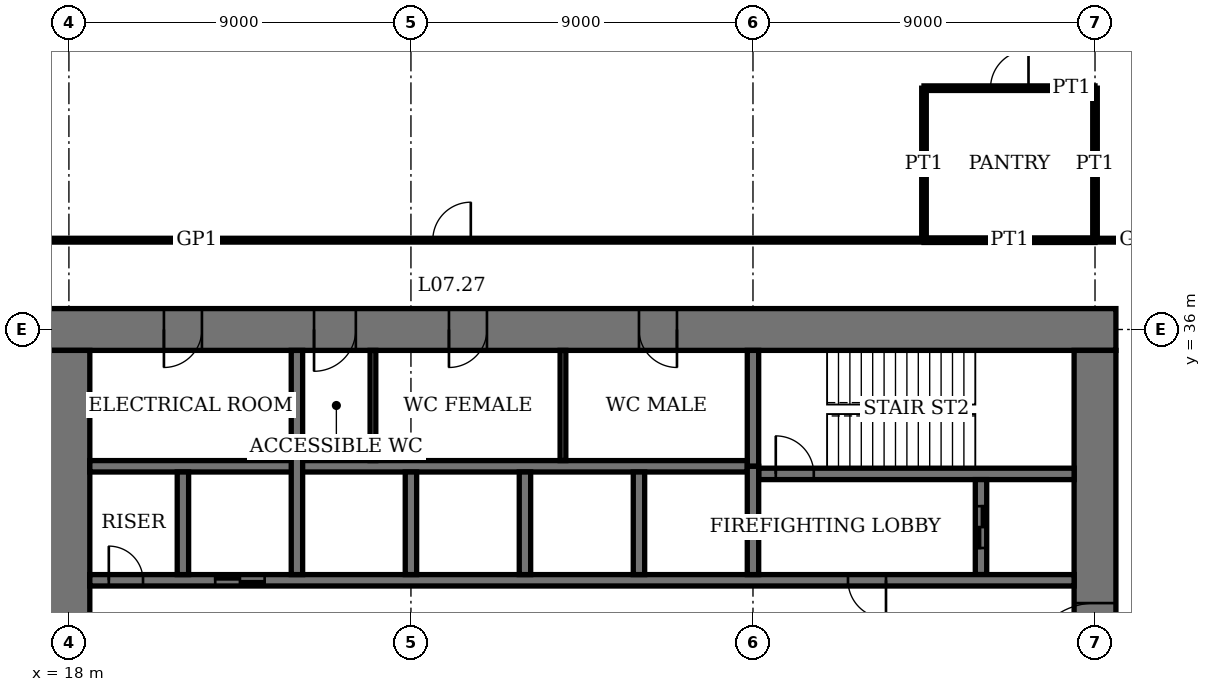
"""IFC4 building model, lengths in metres.
Left out: names, types, materials, properties, quantities, classifications, styles, units other than length and angle.
Written with IfcOpenShell. Run it as: python <this file> out.ifc"""

import sys

from ifc_helpers import new_model, si_unit, direction, frame, frame_2d, origin, place, context, subcontext, project, spatial, rectangle, extrude, element, fill, save


model = new_model("IFC4")
c1 = context("Model", 3, precision=1e-05, world=origin(), true_north=direction((0.0, 1.0)))
c2 = subcontext(c1, "Body", "Model", "MODEL_VIEW")
j1 = project(units=[si_unit("LENGTHUNIT", "METRE"), si_unit("PLANEANGLEUNIT", "RADIAN")], contexts=[c1])
p1 = place(None, origin())
s1 = spatial("IfcSite", under=j1, at=p1, CompositionType="ELEMENT")
p2 = place(p1, origin())
s2 = spatial("IfcBuilding", under=s1, at=p2, CompositionType="ELEMENT")
p3 = place(p2, frame((0.0, 0.0, 31.8)))
s3 = spatial("IfcBuildingStorey", under=s2, at=p3, CompositionType="ELEMENT", Elevation=31.8)
p4 = place(p3, frame((45.55, 36.0, 0.0), z_axis=(0.0, 0.0, 1.0), x_axis=(-1.0, 0.0, 0.0)))
e1 = element("IfcWall", 1, at=p4, inside=s3, PredefinedType="SHEAR", context=c2, shape_type="SweptSolid", body=[
    extrude(rectangle(XDim=28.1, YDim=1.1, at=frame_2d((14.05, 0.0))), origin(), (0.0, 0.0, 1.0), 4.0),
])
p5 = place(p4, frame((11.55, 0.0, 0.0)))
e2 = element("IfcOpeningElement", 2, at=p5, cuts=e1, PredefinedType="OPENING", context=c2, shape_type="SweptSolid", body=[
    extrude(rectangle(XDim=1.0, YDim=2.4, at=frame_2d((0.5, 1.2))), frame((0.0, 0.56, 0.0), z_axis=(0.0, -1.0, 0.0), x_axis=(1.0, 0.0, 0.0)), (0.0, 0.0, 1.0), 1.12),
])
p6 = place(p4, frame((16.55, 0.0, 0.0)))
e3 = element("IfcOpeningElement", 3, at=p6, cuts=e1, PredefinedType="OPENING", context=c2, shape_type="SweptSolid", body=[
    extrude(rectangle(XDim=1.0, YDim=2.4, at=frame_2d((0.5, 1.2))), frame((0.0, 0.56, 0.0), z_axis=(0.0, -1.0, 0.0), x_axis=(1.0, 0.0, 0.0)), (0.0, 0.0, 1.0), 1.12),
])
p7 = place(p4, frame((20.0, 0.0, 0.0)))
e4 = element("IfcOpeningElement", 4, at=p7, cuts=e1, PredefinedType="OPENING", context=c2, shape_type="SweptSolid", body=[
    extrude(rectangle(XDim=1.1, YDim=2.4, at=frame_2d((0.55, 1.2))), frame((0.0, 0.56, 0.0), z_axis=(0.0, -1.0, 0.0), x_axis=(1.0, 0.0, 0.0)), (0.0, 0.0, 1.0), 1.12),
])
p8 = place(p4, frame((24.05, 0.0, 0.0)))
e5 = element("IfcOpeningElement", 5, at=p8, cuts=e1, PredefinedType="OPENING", context=c2, shape_type="SweptSolid", body=[
    extrude(rectangle(XDim=1.0, YDim=2.4, at=frame_2d((0.5, 1.2))), frame((0.0, 0.56, 0.0), z_axis=(0.0, -1.0, 0.0), x_axis=(1.0, 0.0, 0.0)), (0.0, 0.0, 1.0), 1.12),
])
p9 = place(p3, frame((18.0, 35.45, 0.0), z_axis=(0.0, 0.0, 1.0), x_axis=(0.0, -1.0, 0.0)))
e6 = element("IfcWall", 6, at=p9, inside=s3, PredefinedType="SHEAR", context=c2, shape_type="SweptSolid", body=[
    extrude(rectangle(XDim=16.9, YDim=1.1, at=frame_2d((8.45, 0.0))), origin(), (0.0, 0.0, 1.0), 4.0),
])
p10 = place(p9, frame((8.45, 0.0, 0.0)))
e7 = element("IfcOpeningElement", 7, at=p10, cuts=e6, PredefinedType="OPENING", context=c2, shape_type="SweptSolid", body=[
    extrude(rectangle(XDim=1.8, YDim=2.4, at=frame_2d((0.9, 1.2))), frame((0.0, 0.56, 0.0), z_axis=(0.0, -1.0, 0.0), x_axis=(1.0, 0.0, 0.0)), (0.0, 0.0, 1.0), 1.12),
])
p11 = place(p3, frame((45.0, 18.55, 0.0), z_axis=(0.0, 0.0, 1.0), x_axis=(0.0, 1.0, 0.0)))
e8 = element("IfcWall", 8, at=p11, inside=s3, PredefinedType="SHEAR", context=c2, shape_type="SweptSolid", body=[
    extrude(rectangle(XDim=16.9, YDim=1.1, at=frame_2d((8.45, 0.0))), origin(), (0.0, 0.0, 1.0), 4.0),
])
p12 = place(p11, frame((8.45, 0.0, 0.0)))
e9 = element("IfcOpeningElement", 9, at=p12, cuts=e8, PredefinedType="OPENING", context=c2, shape_type="SweptSolid", body=[
    extrude(rectangle(XDim=1.8, YDim=2.4, at=frame_2d((0.9, 1.2))), frame((0.0, 0.56, 0.0), z_axis=(0.0, -1.0, 0.0), x_axis=(1.0, 0.0, 0.0)), (0.0, 0.0, 1.0), 1.12),
])
p13 = place(p3, frame((36.15, 32.2, 0.0), z_axis=(0.0, 0.0, 1.0), x_axis=(1.0, 0.0, 0.0)))
e10 = element("IfcWall", 10, at=p13, inside=s3, PredefinedType="SHEAR", context=c2, shape_type="SweptSolid", body=[
    extrude(rectangle(XDim=8.3, YDim=0.3, at=frame_2d((4.15, 0.0))), origin(), (0.0, 0.0, 1.0), 4.0),
])
p14 = place(p13, frame((0.45, 0.0, 0.0)))
e11 = element("IfcOpeningElement", 11, at=p14, cuts=e10, PredefinedType="OPENING", context=c2, shape_type="SweptSolid", body=[
    extrude(rectangle(XDim=1.0, YDim=2.4, at=frame_2d((0.5, 1.2))), frame((0.0, 0.16, 0.0), z_axis=(0.0, -1.0, 0.0), x_axis=(1.0, 0.0, 0.0)), (0.0, 0.0, 1.0), 0.32),
])
p15 = place(p3, frame((36.0, 32.4, 0.0), z_axis=(0.0, 0.0, 1.0), x_axis=(0.0, 1.0, 0.0)))
e12 = element("IfcWall", 12, at=p15, inside=s3, PredefinedType="SHEAR", context=c2, shape_type="SweptSolid", body=[
    extrude(rectangle(XDim=3.05, YDim=0.3, at=frame_2d((1.525, 0.0))), origin(), (0.0, 0.0, 1.0), 4.0),
])
p16 = place(p3, frame((42.0, 29.55, 0.0), z_axis=(0.0, 0.0, 1.0), x_axis=(0.0, 1.0, 0.0)))
e13 = element("IfcWall", 13, at=p16, inside=s3, PredefinedType="SHEAR", context=c2, shape_type="SweptSolid", body=[
    extrude(rectangle(XDim=2.5, YDim=0.3, at=frame_2d((1.25, 0.0))), origin(), (0.0, 0.0, 1.0), 4.0),
])
p17 = place(p16, frame((0.7, 0.0, 0.0)))
e14 = element("IfcOpeningElement", 14, at=p17, cuts=e13, PredefinedType="OPENING", context=c2, shape_type="SweptSolid", body=[
    extrude(rectangle(XDim=1.1, YDim=2.4, at=frame_2d((0.55, 1.2))), frame((0.0, 0.16, 0.0), z_axis=(0.0, -1.0, 0.0), x_axis=(1.0, 0.0, 0.0)), (0.0, 0.0, 1.0), 0.32),
])
p18 = place(p3, frame((18.55, 29.4, 0.0), z_axis=(0.0, 0.0, 1.0), x_axis=(1.0, 0.0, 0.0)))
e15 = element("IfcWall", 15, at=p18, inside=s3, PredefinedType="SHEAR", context=c2, shape_type="SweptSolid", body=[
    extrude(rectangle(XDim=25.9, YDim=0.3, at=frame_2d((12.95, 0.0))), origin(), (0.0, 0.0, 1.0), 4.0),
])
p19 = place(p18, frame((19.95, 0.0, 0.0)))
e16 = element("IfcOpeningElement", 16, at=p19, cuts=e15, PredefinedType="OPENING", context=c2, shape_type="SweptSolid", body=[
    extrude(rectangle(XDim=1.0, YDim=2.4, at=frame_2d((0.5, 1.2))), frame((0.0, 0.16, 0.0), z_axis=(0.0, -1.0, 0.0), x_axis=(1.0, 0.0, 0.0)), (0.0, 0.0, 1.0), 0.32),
])
p20 = place(p18, frame((0.5, 0.0, 0.0)))
e17 = element("IfcOpeningElement", 17, at=p20, cuts=e15, PredefinedType="OPENING", context=c2, shape_type="SweptSolid", body=[
    extrude(rectangle(XDim=0.9, YDim=2.1, at=frame_2d((0.45, 1.05))), frame((0.0, 0.16, 0.0), z_axis=(0.0, -1.0, 0.0), x_axis=(1.0, 0.0, 0.0)), (0.0, 0.0, 1.0), 0.32),
])
p21 = place(p18, frame((3.3, 0.0, 0.0)))
e18 = element("IfcOpeningElement", 18, at=p21, cuts=e15, PredefinedType="OPENING", context=c2, shape_type="SweptSolid", body=[
    extrude(rectangle(XDim=1.3, YDim=2.4, at=frame_2d((0.65, 1.2))), frame((0.0, 0.16, 0.0), z_axis=(0.0, -1.0, 0.0), x_axis=(1.0, 0.0, 0.0)), (0.0, 0.0, 1.0), 0.32),
])
p22 = place(p3, frame((18.55, 32.4, 0.0), z_axis=(0.0, 0.0, 1.0), x_axis=(1.0, 0.0, 0.0)))
e19 = element("IfcWall", 19, at=p22, inside=s3, PredefinedType="SHEAR", context=c2, shape_type="SweptSolid", body=[
    extrude(rectangle(XDim=17.3, YDim=0.3, at=frame_2d((8.65, 0.0))), origin(), (0.0, 0.0, 1.0), 4.0),
])
for number, where, z_axis, x_axis in (
    (20, (33.0, 29.55, 0.0), (0.0, 0.0, 1.0), (0.0, 1.0, 0.0)),
    (21, (30.0, 29.55, 0.0), (0.0, 0.0, 1.0), (0.0, 1.0, 0.0)),
    (22, (27.0, 29.55, 0.0), (0.0, 0.0, 1.0), (0.0, 1.0, 0.0)),
):
    element("IfcWall", number, at=place(p3, frame(where, z_axis=z_axis, x_axis=x_axis)), inside=s3, PredefinedType="SHEAR", context=c2, shape_type="SweptSolid", body=[
        extrude(rectangle(XDim=2.7, YDim=0.3, at=frame_2d((1.35, 0.0))), origin(), (0.0, 0.0, 1.0), 4.0),
    ])
p23 = place(p3, frame((24.0, 29.55, 0.0), z_axis=(0.0, 0.0, 1.0), x_axis=(0.0, 1.0, 0.0)))
e23 = element("IfcWall", 23, at=p23, inside=s3, PredefinedType="SHEAR", context=c2, shape_type="SweptSolid", body=[
    extrude(rectangle(XDim=5.9, YDim=0.3, at=frame_2d((2.95, 0.0))), origin(), (0.0, 0.0, 1.0), 4.0),
])
p24 = place(p3, frame((21.0, 29.55, 0.0), z_axis=(0.0, 0.0, 1.0), x_axis=(0.0, 1.0, 0.0)))
e24 = element("IfcWall", 24, at=p24, inside=s3, PredefinedType="SHEAR", context=c2, shape_type="SweptSolid", body=[
    extrude(rectangle(XDim=2.7, YDim=0.3, at=frame_2d((1.35, 0.0))), origin(), (0.0, 0.0, 1.0), 4.0),
])
p25 = place(p3, frame((36.0, 29.55, 0.0), z_axis=(0.0, 0.0, 1.0), x_axis=(0.0, 1.0, 0.0)))
e25 = element("IfcWall", 25, at=p25, inside=s3, PredefinedType="SHEAR", context=c2, shape_type="SweptSolid", body=[
    extrude(rectangle(XDim=2.85, YDim=0.3, at=frame_2d((1.425, 0.0))), origin(), (0.0, 0.0, 1.0), 4.0),
])
p26 = place(p3, frame((40.5, 38.35, 0.0), z_axis=(0.0, 0.0, 1.0), x_axis=(1.0, 0.0, 0.0)))
e26 = element("IfcWall", 26, at=p26, inside=s3, PredefinedType="PARTITIONING", context=c2, shape_type="SweptSolid", body=[
    extrude(rectangle(XDim=4.5, YDim=0.12, at=frame_2d((2.25, 0.0))), origin(), (0.0, 0.0, 1.0), 3.75),
])
p27 = place(p3, frame((15.65, 38.35, 0.0), z_axis=(0.0, 0.0, 1.0), x_axis=(1.0, 0.0, 0.0)))
e27 = element("IfcWall", 27, at=p27, inside=s3, PredefinedType="PARTITIONING", context=c2, shape_type="SweptSolid", body=[
    extrude(rectangle(XDim=24.85, YDim=0.1, at=frame_2d((12.425, 0.0))), origin(), (0.0, 0.0, 1.0), 3.75),
])
p28 = place(p27, frame((11.925, 0.0, 0.0)))
e28 = element("IfcOpeningElement", 28, at=p28, cuts=e27, PredefinedType="OPENING", context=c2, shape_type="SweptSolid", body=[
    extrude(rectangle(XDim=1.0, YDim=2.4, at=frame_2d((0.5, 1.2))), frame((0.0, 0.06, 0.0), z_axis=(0.0, -1.0, 0.0), x_axis=(1.0, 0.0, 0.0)), (0.0, 0.0, 1.0), 0.12),
])
p29 = place(p3, frame((45.0, 38.35, 0.0), z_axis=(0.0, 0.0, 1.0), x_axis=(1.0, 0.0, 0.0)))
e29 = element("IfcWall", 29, at=p29, inside=s3, PredefinedType="PARTITIONING", context=c2, shape_type="SweptSolid", body=[
    extrude(rectangle(XDim=2.35, YDim=0.1, at=frame_2d((1.175, 0.0))), origin(), (0.0, 0.0, 1.0), 3.75),
])
p30 = place(p3, frame((40.5, 42.35, 0.0), z_axis=(0.0, 0.0, 1.0), x_axis=(1.0, 0.0, 0.0)))
e30 = element("IfcWall", 30, at=p30, inside=s3, PredefinedType="PARTITIONING", context=c2, shape_type="SweptSolid", body=[
    extrude(rectangle(XDim=4.5, YDim=0.12, at=frame_2d((2.25, 0.0))), origin(), (0.0, 0.0, 1.0), 3.75),
])
p31 = place(p30, frame((1.75, 0.0, 0.0)))
e31 = element("IfcOpeningElement", 31, at=p31, cuts=e30, PredefinedType="OPENING", context=c2, shape_type="SweptSolid", body=[
    extrude(rectangle(XDim=1.0, YDim=2.4, at=frame_2d((0.5, 1.2))), frame((0.0, 0.07, 0.0), z_axis=(0.0, -1.0, 0.0), x_axis=(1.0, 0.0, 0.0)), (0.0, 0.0, 1.0), 0.14),
])
p32 = place(p3, frame((40.5, 38.35, 0.0), z_axis=(0.0, 0.0, 1.0), x_axis=(0.0, 1.0, 0.0)))
e32 = element("IfcWall", 32, at=p32, inside=s3, PredefinedType="PARTITIONING", context=c2, shape_type="SweptSolid", body=[
    extrude(rectangle(XDim=4.0, YDim=0.12, at=frame_2d((2.0, 0.0))), origin(), (0.0, 0.0, 1.0), 3.75),
])
p33 = place(p3, frame((45.0, 38.35, 0.0), z_axis=(0.0, 0.0, 1.0), x_axis=(0.0, 1.0, 0.0)))
e33 = element("IfcWall", 33, at=p33, inside=s3, PredefinedType="PARTITIONING", context=c2, shape_type="SweptSolid", body=[
    extrude(rectangle(XDim=4.0, YDim=0.12, at=frame_2d((2.0, 0.0))), origin(), (0.0, 0.0, 1.0), 3.05),
])
for number, where, z_axis, x_axis in (
    (34, (31.0, 32.55, 0.0), (0.0, 0.0, 1.0), (0.0, 1.0, 0.0)),
    (35, (26.0, 32.55, 0.0), (0.0, 0.0, 1.0), (0.0, 1.0, 0.0)),
):
    element("IfcWall", number, at=place(p3, frame(where, z_axis=z_axis, x_axis=x_axis)), inside=s3, PredefinedType="PARTITIONING", context=c2, shape_type="SweptSolid", body=[
        extrude(rectangle(XDim=2.9, YDim=0.15, at=frame_2d((1.45, 0.0))), origin(), (0.0, 0.0, 1.0), 3.75),
    ])
p34 = place(p12, origin())
e36 = element("IfcDoor", 36, at=p34, inside=s3, OperationType="DOUBLE_DOOR_DOUBLE_SWING", PredefinedType="DOOR", context=c2, shape_type="SweptSolid", body=[
    extrude(rectangle(XDim=1.8, YDim=2.4, at=frame_2d((0.9, 1.2))), frame((0.0, 0.03, 0.0), z_axis=(0.0, -1.0, 0.0), x_axis=(1.0, 0.0, 0.0)), (0.0, 0.0, 1.0), 0.06),
    extrude(rectangle(XDim=0.04, YDim=2.4, at=frame_2d((0.02, 1.2))), frame((0.0, 0.55, 0.0), z_axis=(0.0, -1.0, 0.0), x_axis=(1.0, 0.0, 0.0)), (0.0, 0.0, 1.0), 1.1),
    extrude(rectangle(XDim=0.04, YDim=2.4, at=frame_2d((1.78, 1.2))), frame((0.0, 0.55, 0.0), z_axis=(0.0, -1.0, 0.0), x_axis=(1.0, 0.0, 0.0)), (0.0, 0.0, 1.0), 1.1),
    extrude(rectangle(XDim=1.8, YDim=0.04, at=frame_2d((0.9, 2.38))), frame((0.0, 0.55, 0.0), z_axis=(0.0, -1.0, 0.0), x_axis=(1.0, 0.0, 0.0)), (0.0, 0.0, 1.0), 1.1),
])
fill(e9, e36)
p35 = place(p5, origin())
e37 = element("IfcDoor", 37, at=p35, inside=s3, OperationType="SINGLE_SWING_RIGHT", PredefinedType="DOOR", context=c2, shape_type="SweptSolid", body=[
    extrude(rectangle(XDim=1.0, YDim=2.4, at=frame_2d((0.5, 1.2))), frame((0.0, 0.025, 0.0), z_axis=(0.0, -1.0, 0.0), x_axis=(1.0, 0.0, 0.0)), (0.0, 0.0, 1.0), 0.05),
    extrude(rectangle(XDim=0.04, YDim=2.4, at=frame_2d((0.02, 1.2))), frame((0.0, 0.4, 0.0), z_axis=(0.0, -1.0, 0.0), x_axis=(1.0, 0.0, 0.0)), (0.0, 0.0, 1.0), 0.8),
    extrude(rectangle(XDim=0.04, YDim=2.4, at=frame_2d((0.98, 1.2))), frame((0.0, 0.4, 0.0), z_axis=(0.0, -1.0, 0.0), x_axis=(1.0, 0.0, 0.0)), (0.0, 0.0, 1.0), 0.8),
    extrude(rectangle(XDim=1.0, YDim=0.04, at=frame_2d((0.5, 2.38))), frame((0.0, 0.4, 0.0), z_axis=(0.0, -1.0, 0.0), x_axis=(1.0, 0.0, 0.0)), (0.0, 0.0, 1.0), 0.8),
])
fill(e2, e37)
p36 = place(p6, origin())
e38 = element("IfcDoor", 38, at=p36, inside=s3, OperationType="SINGLE_SWING_LEFT", PredefinedType="DOOR", context=c2, shape_type="SweptSolid", body=[
    extrude(rectangle(XDim=1.0, YDim=2.4, at=frame_2d((0.5, 1.2))), frame((0.0, 0.025, 0.0), z_axis=(0.0, -1.0, 0.0), x_axis=(1.0, 0.0, 0.0)), (0.0, 0.0, 1.0), 0.05),
    extrude(rectangle(XDim=0.04, YDim=2.4, at=frame_2d((0.02, 1.2))), frame((0.0, 0.4, 0.0), z_axis=(0.0, -1.0, 0.0), x_axis=(1.0, 0.0, 0.0)), (0.0, 0.0, 1.0), 0.8),
    extrude(rectangle(XDim=0.04, YDim=2.4, at=frame_2d((0.98, 1.2))), frame((0.0, 0.4, 0.0), z_axis=(0.0, -1.0, 0.0), x_axis=(1.0, 0.0, 0.0)), (0.0, 0.0, 1.0), 0.8),
    extrude(rectangle(XDim=1.0, YDim=0.04, at=frame_2d((0.5, 2.38))), frame((0.0, 0.4, 0.0), z_axis=(0.0, -1.0, 0.0), x_axis=(1.0, 0.0, 0.0)), (0.0, 0.0, 1.0), 0.8),
])
fill(e3, e38)
p37 = place(p7, origin())
e39 = element("IfcDoor", 39, at=p37, inside=s3, OperationType="SINGLE_SWING_LEFT", PredefinedType="DOOR", context=c2, shape_type="SweptSolid", body=[
    extrude(rectangle(XDim=1.1, YDim=2.4, at=frame_2d((0.55, 1.2))), frame((0.0, 0.025, 0.0), z_axis=(0.0, -1.0, 0.0), x_axis=(1.0, 0.0, 0.0)), (0.0, 0.0, 1.0), 0.05),
    extrude(rectangle(XDim=0.04, YDim=2.4, at=frame_2d((0.02, 1.2))), frame((0.0, 0.44, 0.0), z_axis=(0.0, -1.0, 0.0), x_axis=(1.0, 0.0, 0.0)), (0.0, 0.0, 1.0), 0.88),
    extrude(rectangle(XDim=0.04, YDim=2.4, at=frame_2d((1.08, 1.2))), frame((0.0, 0.44, 0.0), z_axis=(0.0, -1.0, 0.0), x_axis=(1.0, 0.0, 0.0)), (0.0, 0.0, 1.0), 0.88),
    extrude(rectangle(XDim=1.1, YDim=0.04, at=frame_2d((0.55, 2.38))), frame((0.0, 0.44, 0.0), z_axis=(0.0, -1.0, 0.0), x_axis=(1.0, 0.0, 0.0)), (0.0, 0.0, 1.0), 0.88),
])
fill(e4, e39)
p38 = place(p8, origin())
e40 = element("IfcDoor", 40, at=p38, inside=s3, OperationType="SINGLE_SWING_LEFT", PredefinedType="DOOR", context=c2, shape_type="SweptSolid", body=[
    extrude(rectangle(XDim=1.0, YDim=2.4, at=frame_2d((0.5, 1.2))), frame((0.0, 0.025, 0.0), z_axis=(0.0, -1.0, 0.0), x_axis=(1.0, 0.0, 0.0)), (0.0, 0.0, 1.0), 0.05),
    extrude(rectangle(XDim=0.04, YDim=2.4, at=frame_2d((0.02, 1.2))), frame((0.0, 0.4, 0.0), z_axis=(0.0, -1.0, 0.0), x_axis=(1.0, 0.0, 0.0)), (0.0, 0.0, 1.0), 0.8),
    extrude(rectangle(XDim=0.04, YDim=2.4, at=frame_2d((0.98, 1.2))), frame((0.0, 0.4, 0.0), z_axis=(0.0, -1.0, 0.0), x_axis=(1.0, 0.0, 0.0)), (0.0, 0.0, 1.0), 0.8),
    extrude(rectangle(XDim=1.0, YDim=0.04, at=frame_2d((0.5, 2.38))), frame((0.0, 0.4, 0.0), z_axis=(0.0, -1.0, 0.0), x_axis=(1.0, 0.0, 0.0)), (0.0, 0.0, 1.0), 0.8),
])
fill(e5, e40)
p39 = place(p14, origin())
e41 = element("IfcDoor", 41, at=p39, inside=s3, OperationType="SINGLE_SWING_RIGHT", PredefinedType="DOOR", context=c2, shape_type="SweptSolid", body=[
    extrude(rectangle(XDim=1.0, YDim=2.4, at=frame_2d((0.5, 1.2))), frame((0.0, 0.03, 0.0), z_axis=(0.0, -1.0, 0.0), x_axis=(1.0, 0.0, 0.0)), (0.0, 0.0, 1.0), 0.06),
])
fill(e11, e41)
p40 = place(p19, origin())
e42 = element("IfcDoor", 42, at=p40, inside=s3, OperationType="SINGLE_SWING_RIGHT", PredefinedType="DOOR", context=c2, shape_type="SweptSolid", body=[
    extrude(rectangle(XDim=1.0, YDim=2.4, at=frame_2d((0.5, 1.2))), frame((0.0, 0.03, 0.0), z_axis=(0.0, -1.0, 0.0), x_axis=(1.0, 0.0, 0.0)), (0.0, 0.0, 1.0), 0.06),
])
fill(e16, e42)
p41 = place(p20, origin())
e43 = element("IfcDoor", 43, at=p41, inside=s3, OperationType="SINGLE_SWING_RIGHT", PredefinedType="DOOR", context=c2, shape_type="SweptSolid", body=[
    extrude(rectangle(XDim=0.9, YDim=2.1, at=frame_2d((0.45, 1.05))), frame((0.0, 0.03, 0.0), z_axis=(0.0, -1.0, 0.0), x_axis=(1.0, 0.0, 0.0)), (0.0, 0.0, 1.0), 0.06),
])
fill(e17, e43)
p42 = place(p28, origin())
e44 = element("IfcDoor", 44, at=p42, inside=s3, OperationType="SINGLE_SWING_LEFT", PredefinedType="DOOR", context=c2, shape_type="SweptSolid", body=[
    extrude(rectangle(XDim=1.0, YDim=2.4, at=frame_2d((0.5, 1.2))), frame((0.0, 0.02, 0.0), z_axis=(0.0, -1.0, 0.0), x_axis=(1.0, 0.0, 0.0)), (0.0, 0.0, 1.0), 0.04),
])
fill(e28, e44)
p43 = place(p31, origin())
e45 = element("IfcDoor", 45, at=p43, inside=s3, OperationType="SINGLE_SWING_LEFT", PredefinedType="DOOR", context=c2, shape_type="SweptSolid", body=[
    extrude(rectangle(XDim=1.0, YDim=2.4, at=frame_2d((0.5, 1.2))), frame((0.0, 0.025, 0.0), z_axis=(0.0, -1.0, 0.0), x_axis=(1.0, 0.0, 0.0)), (0.0, 0.0, 1.0), 0.05),
])
fill(e31, e45)
p44 = place(p21, origin())
e46 = element("IfcDoor", 46, at=p44, inside=s3, OperationType="DOUBLE_DOOR_SLIDING", PredefinedType="DOOR", context=c2, shape_type="SweptSolid", body=[
    extrude(rectangle(XDim=1.3, YDim=2.4, at=frame_2d((0.65, 1.2))), frame((0.0, 0.02, 0.0), z_axis=(0.0, -1.0, 0.0), x_axis=(1.0, 0.0, 0.0)), (0.0, 0.0, 1.0), 0.04),
])
fill(e18, e46)
p45 = place(p17, origin())
e47 = element("IfcDoor", 47, at=p45, inside=s3, OperationType="DOUBLE_DOOR_SLIDING", PredefinedType="DOOR", context=c2, shape_type="SweptSolid", body=[
    extrude(rectangle(XDim=1.1, YDim=2.4, at=frame_2d((0.55, 1.2))), frame((0.0, 0.03, 0.0), z_axis=(0.0, -1.0, 0.0), x_axis=(1.0, 0.0, 0.0)), (0.0, 0.0, 1.0), 0.06),
])
fill(e14, e47)
save(model, sys.argv[1])
